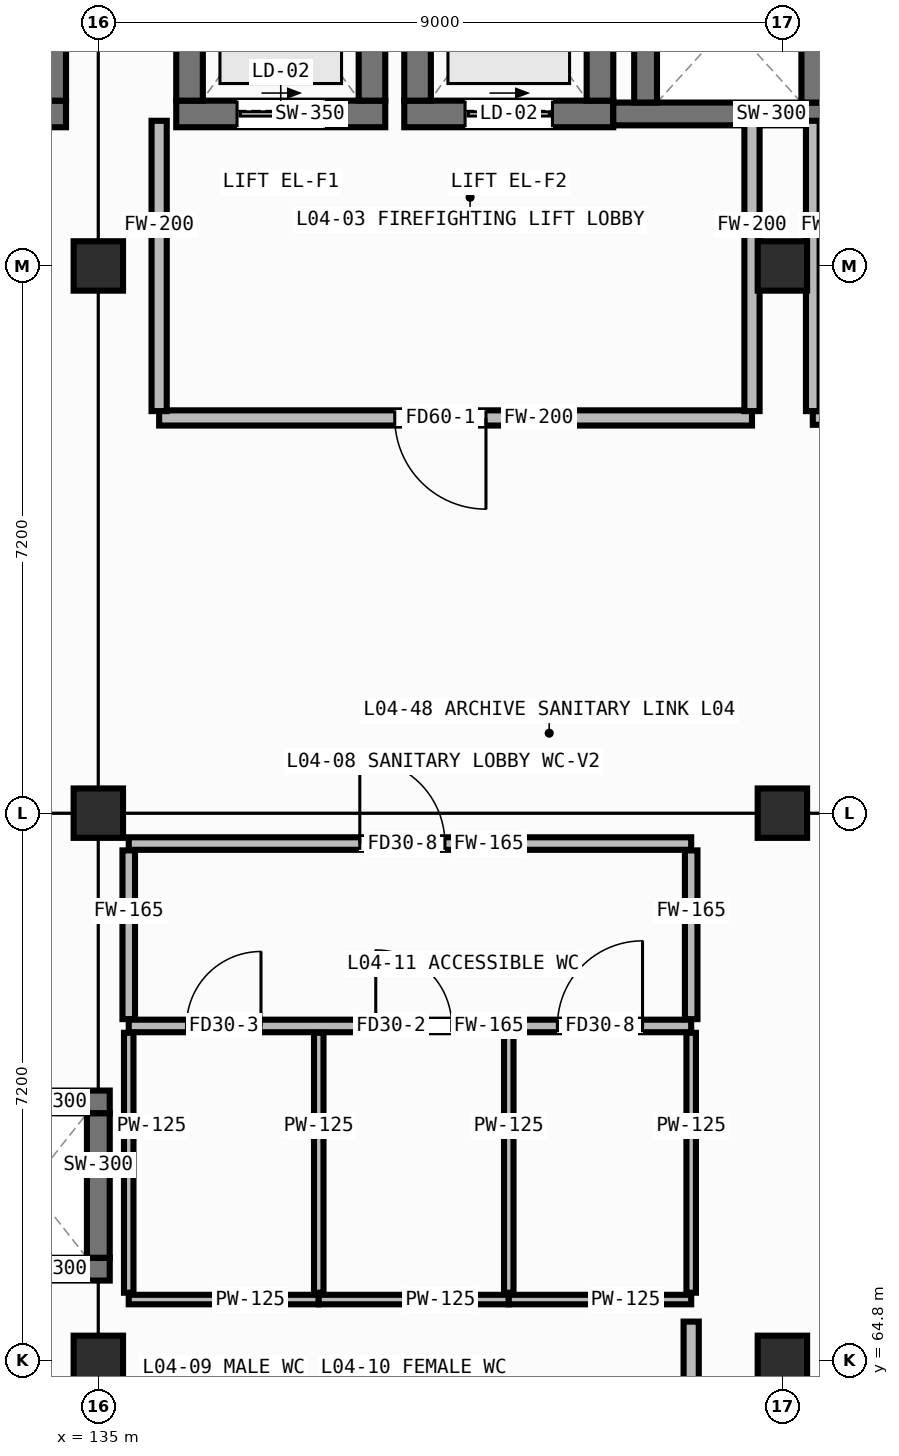
"""IFC4 building model, lengths in metres.
Left out: names, types, materials, properties, quantities, classifications, styles, units other than length and angle.
Written with IfcOpenShell. Run it as: python <this file> out.ifc"""

import sys

from ifc_helpers import new_model, si_unit, direction, frame, frame_2d, origin, origin_2d, place, context, subcontext, project, spatial, rectangle, hollow_rectangle, extrude, element, fill, save


model = new_model("IFC4")
c1 = context("Model", 3, precision=1e-05, world=origin(), true_north=direction((0.0, 1.0)))
c2 = subcontext(c1, "Body", "Model", "MODEL_VIEW")
j1 = project(units=[si_unit("LENGTHUNIT", "METRE"), si_unit("PLANEANGLEUNIT", "RADIAN")], contexts=[c1])
p1 = place(None, origin())
s1 = spatial("IfcSite", under=j1, at=p1, CompositionType="ELEMENT")
p2 = place(p1, origin())
s2 = spatial("IfcBuilding", under=s1, at=p2, CompositionType="ELEMENT")
p3 = place(p2, frame((0.0, 0.0, 12.8)))
s3 = spatial("IfcBuildingStorey", under=s2, at=p3, CompositionType="ELEMENT", Elevation=12.8)
for number, where, z_axis, x_axis in (
    (1, (135.0, 64.8, 0.0), (0.0, 0.0, 1.0), (1.0, 0.0, 0.0)),
    (2, (135.0, 72.0, 0.0), (0.0, 0.0, 1.0), (1.0, 0.0, 0.0)),
    (3, (135.0, 79.2, 0.0), (0.0, 0.0, 1.0), (1.0, 0.0, 0.0)),
    (4, (144.0, 64.8, 0.0), (0.0, 0.0, 1.0), (1.0, 0.0, 0.0)),
    (5, (144.0, 72.0, 0.0), (0.0, 0.0, 1.0), (1.0, 0.0, 0.0)),
    (6, (144.0, 79.2, 0.0), (0.0, 0.0, 1.0), (1.0, 0.0, 0.0)),
):
    element("IfcColumn", number, at=place(p3, frame(where, z_axis=z_axis, x_axis=x_axis)), inside=s3, PredefinedType="COLUMN", context=c2, shape_type="SweptSolid", body=[
        extrude(hollow_rectangle(XDim=0.65, YDim=0.65, WallThickness=0.025, at=origin_2d()), origin(), (0.0, 0.0, 1.0), 4.2),
    ])
p4 = place(p3, frame((126.425, 81.2, 0.0), z_axis=(0.0, 0.0, 1.0), x_axis=(1.0, 0.0, 0.0)))
e7 = element("IfcWall", 7, at=p4, inside=s3, PredefinedType="SHEAR", context=c2, shape_type="SweptSolid", body=[
    extrude(rectangle(XDim=8.15, YDim=0.35, at=frame_2d((4.075, 0.0))), origin(), (0.0, 0.0, 1.0), 3.94),
])
p5 = place(p4, frame((0.525, 0.0, 0.0)))
e8 = element("IfcOpeningElement", 8, at=p5, cuts=e7, PredefinedType="OPENING", context=c2, shape_type="SweptSolid", body=[
    extrude(rectangle(XDim=1.15, YDim=2.1, at=frame_2d((0.575, 1.05))), frame((0.0, 0.187, 0.0), z_axis=(0.0, -1.0, 0.0), x_axis=(1.0, 0.0, 0.0)), (0.0, 0.0, 1.0), 0.374),
])
p6 = place(p3, frame((134.4, 81.375, 0.0), z_axis=(0.0, 0.0, 1.0), x_axis=(0.0, 1.0, 0.0)))
e9 = element("IfcWall", 9, at=p6, inside=s3, PredefinedType="SHEAR", context=c2, shape_type="SweptSolid", body=[
    extrude(rectangle(XDim=3.55, YDim=0.35, at=frame_2d((1.775, 0.0))), origin(), (0.0, 0.0, 1.0), 3.94),
])
p7 = place(p3, frame((136.025, 81.2, 0.0), z_axis=(0.0, 0.0, 1.0), x_axis=(1.0, 0.0, 0.0)))
e10 = element("IfcWall", 10, at=p7, inside=s3, PredefinedType="SHEAR", context=c2, shape_type="SweptSolid", body=[
    extrude(rectangle(XDim=2.75, YDim=0.35, at=frame_2d((1.375, 0.0))), origin(), (0.0, 0.0, 1.0), 3.94),
])
p8 = place(p7, frame((0.8, 0.0, 0.0)))
e11 = element("IfcOpeningElement", 11, at=p8, cuts=e10, PredefinedType="OPENING", context=c2, shape_type="SweptSolid", body=[
    extrude(rectangle(XDim=1.15, YDim=2.12, at=frame_2d((0.575, 1.06))), frame((0.0, 0.187, 0.0), z_axis=(0.0, -1.0, 0.0), x_axis=(1.0, 0.0, 0.0)), (0.0, 0.0, 1.0), 0.374),
])
for number, where, z_axis, x_axis in (
    (12, (136.2, 81.375, 0.0), (0.0, 0.0, 1.0), (0.0, 1.0, 0.0)),
    (13, (138.6, 81.375, 0.0), (0.0, 0.0, 1.0), (0.0, 1.0, 0.0)),
):
    element("IfcWall", number, at=place(p3, frame(where, z_axis=z_axis, x_axis=x_axis)), inside=s3, PredefinedType="SHEAR", context=c2, shape_type="SweptSolid", body=[
        extrude(rectangle(XDim=2.85, YDim=0.35, at=frame_2d((1.425, 0.0))), origin(), (0.0, 0.0, 1.0), 3.94),
    ])
p9 = place(p3, frame((139.025, 81.2, 0.0), z_axis=(0.0, 0.0, 1.0), x_axis=(1.0, 0.0, 0.0)))
e14 = element("IfcWall", 14, at=p9, inside=s3, PredefinedType="SHEAR", context=c2, shape_type="SweptSolid", body=[
    extrude(rectangle(XDim=2.75, YDim=0.35, at=frame_2d((1.375, 0.0))), origin(), (0.0, 0.0, 1.0), 3.94),
])
p10 = place(p9, frame((0.8, 0.0, 0.0)))
e15 = element("IfcOpeningElement", 15, at=p10, cuts=e14, PredefinedType="OPENING", context=c2, shape_type="SweptSolid", body=[
    extrude(rectangle(XDim=1.15, YDim=2.12, at=frame_2d((0.575, 1.06))), frame((0.0, 0.187, 0.0), z_axis=(0.0, -1.0, 0.0), x_axis=(1.0, 0.0, 0.0)), (0.0, 0.0, 1.0), 0.374),
])
for number, where, z_axis, x_axis in (
    (16, (139.2, 81.375, 0.0), (0.0, 0.0, 1.0), (0.0, 1.0, 0.0)),
    (17, (141.6, 81.375, 0.0), (0.0, 0.0, 1.0), (0.0, 1.0, 0.0)),
):
    element("IfcWall", number, at=place(p3, frame(where, z_axis=z_axis, x_axis=x_axis)), inside=s3, PredefinedType="SHEAR", context=c2, shape_type="SweptSolid", body=[
        extrude(rectangle(XDim=2.85, YDim=0.35, at=frame_2d((1.425, 0.0))), origin(), (0.0, 0.0, 1.0), 3.94),
    ])
p11 = place(p3, frame((141.775, 81.2, 0.0), z_axis=(0.0, 0.0, 1.0), x_axis=(1.0, 0.0, 0.0)))
e18 = element("IfcWall", 18, at=p11, inside=s3, PredefinedType="SHEAR", context=c2, shape_type="SweptSolid", body=[
    extrude(rectangle(XDim=3.25, YDim=0.3, at=frame_2d((1.625, 0.0))), origin(), (0.0, 0.0, 1.0), 3.94),
])
for number, where, z_axis, x_axis in (
    (19, (142.2, 81.35, 0.0), (0.0, 0.0, 1.0), (0.0, 1.0, 0.0)),
    (20, (144.4, 81.35, 0.0), (0.0, 0.0, 1.0), (0.0, 1.0, 0.0)),
    (21, (133.05, 66.0, 0.0), (0.0, 0.0, 1.0), (1.0, 0.0, 0.0)),
    (22, (133.05, 68.2, 0.0), (0.0, 0.0, 1.0), (1.0, 0.0, 0.0)),
):
    element("IfcWall", number, at=place(p3, frame(where, z_axis=z_axis, x_axis=x_axis)), inside=s3, PredefinedType="SHEAR", context=c2, shape_type="SweptSolid", body=[
        extrude(rectangle(XDim=2.1, YDim=0.3, at=frame_2d((1.05, 0.0))), origin(), (0.0, 0.0, 1.0), 3.94),
    ])
p12 = place(p3, frame((135.0, 66.15, 0.0), z_axis=(0.0, 0.0, 1.0), x_axis=(0.0, 1.0, 0.0)))
e23 = element("IfcWall", 23, at=p12, inside=s3, PredefinedType="SHEAR", context=c2, shape_type="SweptSolid", body=[
    extrude(rectangle(XDim=1.9, YDim=0.3, at=frame_2d((0.95, 0.0))), origin(), (0.0, 0.0, 1.0), 3.94),
])
p13 = place(p3, frame((135.8, 77.2, 0.0), z_axis=(0.0, 0.0, 1.0), x_axis=(1.0, 0.0, 0.0)))
e24 = element("IfcWall", 24, at=p13, inside=s3, PredefinedType="PARTITIONING", context=c2, shape_type="SweptSolid", body=[
    extrude(rectangle(XDim=7.8, YDim=0.2, at=frame_2d((3.9, 0.0))), origin(), (0.0, 0.0, 1.0), 3.94),
])
p14 = place(p13, frame((3.1, 0.0, 0.0)))
e25 = element("IfcOpeningElement", 25, at=p14, cuts=e24, PredefinedType="OPENING", context=c2, shape_type="SweptSolid", body=[
    extrude(rectangle(XDim=1.2, YDim=2.1, at=frame_2d((0.6, 1.05))), frame((0.0, 0.112, 0.0), z_axis=(0.0, -1.0, 0.0), x_axis=(1.0, 0.0, 0.0)), (0.0, 0.0, 1.0), 0.224),
])
for number, where, z_axis, x_axis in (
    (26, (135.8, 77.29, 0.0), (0.0, 0.0, 1.0), (0.0, 1.0, 0.0)),
    (27, (143.6, 77.29, 0.0), (0.0, 0.0, 1.0), (0.0, 1.0, 0.0)),
):
    element("IfcWall", number, at=place(p3, frame(where, z_axis=z_axis, x_axis=x_axis)), inside=s3, PredefinedType="PARTITIONING", context=c2, shape_type="SweptSolid", body=[
        extrude(rectangle(XDim=3.82, YDim=0.2, at=frame_2d((1.91, 0.0))), origin(), (0.0, 0.0, 1.0), 3.94),
    ])
p15 = place(p3, frame((144.4, 77.2, 0.0), z_axis=(0.0, 0.0, 1.0), x_axis=(1.0, 0.0, 0.0)))
e28 = element("IfcWall", 28, at=p15, inside=s3, PredefinedType="PARTITIONING", context=c2, shape_type="SweptSolid", body=[
    extrude(rectangle(XDim=8.2, YDim=0.18, at=frame_2d((4.1, 0.0))), origin(), (0.0, 0.0, 1.0), 3.94),
])
p16 = place(p15, frame((3.54, 0.0, 0.0)))
e29 = element("IfcOpeningElement", 29, at=p16, cuts=e28, PredefinedType="OPENING", context=c2, shape_type="SweptSolid", body=[
    extrude(rectangle(XDim=1.12, YDim=2.08, at=frame_2d((0.56, 1.04))), frame((0.0, 0.102, 0.0), z_axis=(0.0, -1.0, 0.0), x_axis=(1.0, 0.0, 0.0)), (0.0, 0.0, 1.0), 0.204),
])
p17 = place(p3, frame((144.4, 77.29, 0.0), z_axis=(0.0, 0.0, 1.0), x_axis=(0.0, 1.0, 0.0)))
e30 = element("IfcWall", 30, at=p17, inside=s3, PredefinedType="PARTITIONING", context=c2, shape_type="SweptSolid", body=[
    extrude(rectangle(XDim=3.82, YDim=0.18, at=frame_2d((1.91, 0.0))), origin(), (0.0, 0.0, 1.0), 3.94),
])
p18 = place(p3, frame((135.4, 69.2, 0.0), z_axis=(0.0, 0.0, 1.0), x_axis=(1.0, 0.0, 0.0)))
e31 = element("IfcWall", 31, at=p18, inside=s3, PredefinedType="PARTITIONING", context=c2, shape_type="SweptSolid", body=[
    extrude(rectangle(XDim=7.4, YDim=0.165, at=frame_2d((3.7, 0.0))), origin(), (0.0, 0.0, 1.0), 3.94),
])
p19 = place(p18, frame((0.76, 0.0, 0.0)))
e32 = element("IfcOpeningElement", 32, at=p19, cuts=e31, PredefinedType="OPENING", context=c2, shape_type="SweptSolid", body=[
    extrude(rectangle(XDim=0.98, YDim=2.02, at=frame_2d((0.49, 1.01))), frame((0.0, 0.094, 0.0), z_axis=(0.0, -1.0, 0.0), x_axis=(1.0, 0.0, 0.0)), (0.0, 0.0, 1.0), 0.189),
])
p20 = place(p18, frame((3.25, 0.0, 0.0)))
e33 = element("IfcOpeningElement", 33, at=p20, cuts=e31, PredefinedType="OPENING", context=c2, shape_type="SweptSolid", body=[
    extrude(rectangle(XDim=1.0, YDim=2.08, at=frame_2d((0.5, 1.04))), frame((0.0, 0.094, 0.0), z_axis=(0.0, -1.0, 0.0), x_axis=(1.0, 0.0, 0.0)), (0.0, 0.0, 1.0), 0.189),
])
p21 = place(p18, frame((5.64, 0.0, 0.0)))
e34 = element("IfcOpeningElement", 34, at=p21, cuts=e31, PredefinedType="OPENING", context=c2, shape_type="SweptSolid", body=[
    extrude(rectangle(XDim=1.12, YDim=2.08, at=frame_2d((0.56, 1.04))), frame((0.0, 0.094, 0.0), z_axis=(0.0, -1.0, 0.0), x_axis=(1.0, 0.0, 0.0)), (0.0, 0.0, 1.0), 0.189),
])
p22 = place(p3, frame((135.4, 71.6, 0.0), z_axis=(0.0, 0.0, 1.0), x_axis=(1.0, 0.0, 0.0)))
e35 = element("IfcWall", 35, at=p22, inside=s3, PredefinedType="PARTITIONING", context=c2, shape_type="SweptSolid", body=[
    extrude(rectangle(XDim=7.4, YDim=0.165, at=frame_2d((3.7, 0.0))), origin(), (0.0, 0.0, 1.0), 3.94),
])
p23 = place(p22, frame((3.04, 0.0, 0.0)))
e36 = element("IfcOpeningElement", 36, at=p23, cuts=e35, PredefinedType="OPENING", context=c2, shape_type="SweptSolid", body=[
    extrude(rectangle(XDim=1.12, YDim=2.08, at=frame_2d((0.56, 1.04))), frame((0.0, 0.094, 0.0), z_axis=(0.0, -1.0, 0.0), x_axis=(1.0, 0.0, 0.0)), (0.0, 0.0, 1.0), 0.189),
])
for number, where, z_axis, x_axis in (
    (37, (135.4, 69.29, 0.0), (0.0, 0.0, 1.0), (0.0, 1.0, 0.0)),
    (38, (142.8, 69.29, 0.0), (0.0, 0.0, 1.0), (0.0, 1.0, 0.0)),
):
    element("IfcWall", number, at=place(p3, frame(where, z_axis=z_axis, x_axis=x_axis)), inside=s3, PredefinedType="PARTITIONING", context=c2, shape_type="SweptSolid", body=[
        extrude(rectangle(XDim=2.22, YDim=0.165, at=frame_2d((1.11, 0.0))), origin(), (0.0, 0.0, 1.0), 3.94),
    ])
p24 = place(p3, frame((135.4, 65.6, 0.0), z_axis=(0.0, 0.0, 1.0), x_axis=(1.0, 0.0, 0.0)))
e39 = element("IfcWall", 39, at=p24, inside=s3, PredefinedType="PARTITIONING", context=c2, shape_type="SweptSolid", body=[
    extrude(rectangle(XDim=2.5, YDim=0.125, at=frame_2d((1.25, 0.0))), origin(), (0.0, 0.0, 1.0), 3.94),
])
for number, where, z_axis, x_axis in (
    (40, (135.4, 65.69, 0.0), (0.0, 0.0, 1.0), (0.0, 1.0, 0.0)),
    (41, (137.9, 65.69, 0.0), (0.0, 0.0, 1.0), (0.0, 1.0, 0.0)),
):
    element("IfcWall", number, at=place(p3, frame(where, z_axis=z_axis, x_axis=x_axis)), inside=s3, PredefinedType="PARTITIONING", context=c2, shape_type="SweptSolid", body=[
        extrude(rectangle(XDim=3.42, YDim=0.125, at=frame_2d((1.71, 0.0))), origin(), (0.0, 0.0, 1.0), 3.94),
    ])
p25 = place(p3, frame((137.9, 65.6, 0.0), z_axis=(0.0, 0.0, 1.0), x_axis=(1.0, 0.0, 0.0)))
e42 = element("IfcWall", 42, at=p25, inside=s3, PredefinedType="PARTITIONING", context=c2, shape_type="SweptSolid", body=[
    extrude(rectangle(XDim=2.5, YDim=0.125, at=frame_2d((1.25, 0.0))), origin(), (0.0, 0.0, 1.0), 3.94),
])
p26 = place(p3, frame((140.4, 65.69, 0.0), z_axis=(0.0, 0.0, 1.0), x_axis=(0.0, 1.0, 0.0)))
e43 = element("IfcWall", 43, at=p26, inside=s3, PredefinedType="PARTITIONING", context=c2, shape_type="SweptSolid", body=[
    extrude(rectangle(XDim=3.42, YDim=0.125, at=frame_2d((1.71, 0.0))), origin(), (0.0, 0.0, 1.0), 3.94),
])
p27 = place(p3, frame((140.4, 65.6, 0.0), z_axis=(0.0, 0.0, 1.0), x_axis=(1.0, 0.0, 0.0)))
e44 = element("IfcWall", 44, at=p27, inside=s3, PredefinedType="PARTITIONING", context=c2, shape_type="SweptSolid", body=[
    extrude(rectangle(XDim=2.4, YDim=0.125, at=frame_2d((1.2, 0.0))), origin(), (0.0, 0.0, 1.0), 3.94),
])
p28 = place(p3, frame((142.8, 65.69, 0.0), z_axis=(0.0, 0.0, 1.0), x_axis=(0.0, 1.0, 0.0)))
e45 = element("IfcWall", 45, at=p28, inside=s3, PredefinedType="PARTITIONING", context=c2, shape_type="SweptSolid", body=[
    extrude(rectangle(XDim=3.42, YDim=0.125, at=frame_2d((1.71, 0.0))), origin(), (0.0, 0.0, 1.0), 3.94),
])
p29 = place(p3, frame((142.8, 43.365, 0.0), z_axis=(0.0, 0.0, 1.0), x_axis=(0.0, 1.0, 0.0)))
e46 = element("IfcWall", 46, at=p29, inside=s3, PredefinedType="PARTITIONING", context=c2, shape_type="SweptSolid", body=[
    extrude(rectangle(XDim=21.945, YDim=0.2, at=frame_2d((10.973, 0.0))), origin(), (0.0, 0.0, 1.0), 3.94),
])
p30 = place(p29, frame((17.035, 0.0, 0.0)))
e47 = element("IfcOpeningElement", 47, at=p30, cuts=e46, PredefinedType="OPENING", context=c2, shape_type="SweptSolid", body=[
    extrude(rectangle(XDim=1.6, YDim=2.12, at=frame_2d((0.8, 1.06))), frame((0.0, 0.112, 0.0), z_axis=(0.0, -1.0, 0.0), x_axis=(1.0, 0.0, 0.0)), (0.0, 0.0, 1.0), 0.224),
])
p31 = place(p8, origin())
e48 = element("IfcDoor", 48, at=p31, inside=s3, OperationType="SLIDING_TO_LEFT", PredefinedType="DOOR", context=c2, shape_type="SweptSolid", body=[
    extrude(rectangle(XDim=1.15, YDim=2.12, at=frame_2d((0.575, 1.06))), frame((0.0, 0.025, 0.0), z_axis=(0.0, -1.0, 0.0), x_axis=(1.0, 0.0, 0.0)), (0.0, 0.0, 1.0), 0.05),
])
fill(e11, e48)
p32 = place(p10, origin())
e49 = element("IfcDoor", 49, at=p32, inside=s3, OperationType="SLIDING_TO_LEFT", PredefinedType="DOOR", context=c2, shape_type="SweptSolid", body=[
    extrude(rectangle(XDim=1.15, YDim=2.12, at=frame_2d((0.575, 1.06))), frame((0.0, 0.025, 0.0), z_axis=(0.0, -1.0, 0.0), x_axis=(1.0, 0.0, 0.0)), (0.0, 0.0, 1.0), 0.05),
])
fill(e15, e49)
p33 = place(p14, frame((1.2, 0.0, 0.0), z_axis=(0.0, 0.0, 1.0), x_axis=(-1.0, 0.0, 0.0)))
e50 = element("IfcDoor", 50, at=p33, inside=s3, OperationType="SINGLE_SWING_LEFT", PredefinedType="DOOR", context=c2, shape_type="SweptSolid", body=[
    extrude(rectangle(XDim=1.2, YDim=2.1, at=frame_2d((0.6, 1.05))), frame((0.0, 0.025, 0.0), z_axis=(0.0, -1.0, 0.0), x_axis=(1.0, 0.0, 0.0)), (0.0, 0.0, 1.0), 0.05),
])
fill(e25, e50)
p34 = place(p23, origin())
e51 = element("IfcDoor", 51, at=p34, inside=s3, OperationType="SINGLE_SWING_LEFT", PredefinedType="DOOR", context=c2, shape_type="SweptSolid", body=[
    extrude(rectangle(XDim=1.12, YDim=2.08, at=frame_2d((0.56, 1.04))), frame((0.0, 0.025, 0.0), z_axis=(0.0, -1.0, 0.0), x_axis=(1.0, 0.0, 0.0)), (0.0, 0.0, 1.0), 0.05),
])
fill(e36, e51)
p35 = place(p19, origin())
e52 = element("IfcDoor", 52, at=p35, inside=s3, OperationType="SINGLE_SWING_RIGHT", PredefinedType="DOOR", context=c2, shape_type="SweptSolid", body=[
    extrude(rectangle(XDim=0.98, YDim=2.02, at=frame_2d((0.49, 1.01))), frame((0.0, 0.025, 0.0), z_axis=(0.0, -1.0, 0.0), x_axis=(1.0, 0.0, 0.0)), (0.0, 0.0, 1.0), 0.05),
])
fill(e32, e52)
p36 = place(p20, origin())
e53 = element("IfcDoor", 53, at=p36, inside=s3, OperationType="SINGLE_SWING_LEFT", PredefinedType="DOOR", context=c2, shape_type="SweptSolid", body=[
    extrude(rectangle(XDim=1.0, YDim=2.08, at=frame_2d((0.5, 1.04))), frame((0.0, 0.025, 0.0), z_axis=(0.0, -1.0, 0.0), x_axis=(1.0, 0.0, 0.0)), (0.0, 0.0, 1.0), 0.05),
])
fill(e33, e53)
p37 = place(p21, origin())
e54 = element("IfcDoor", 54, at=p37, inside=s3, OperationType="SINGLE_SWING_RIGHT", PredefinedType="DOOR", context=c2, shape_type="SweptSolid", body=[
    extrude(rectangle(XDim=1.12, YDim=2.08, at=frame_2d((0.56, 1.04))), frame((0.0, 0.025, 0.0), z_axis=(0.0, -1.0, 0.0), x_axis=(1.0, 0.0, 0.0)), (0.0, 0.0, 1.0), 0.05),
])
fill(e34, e54)
save(model, sys.argv[1])
